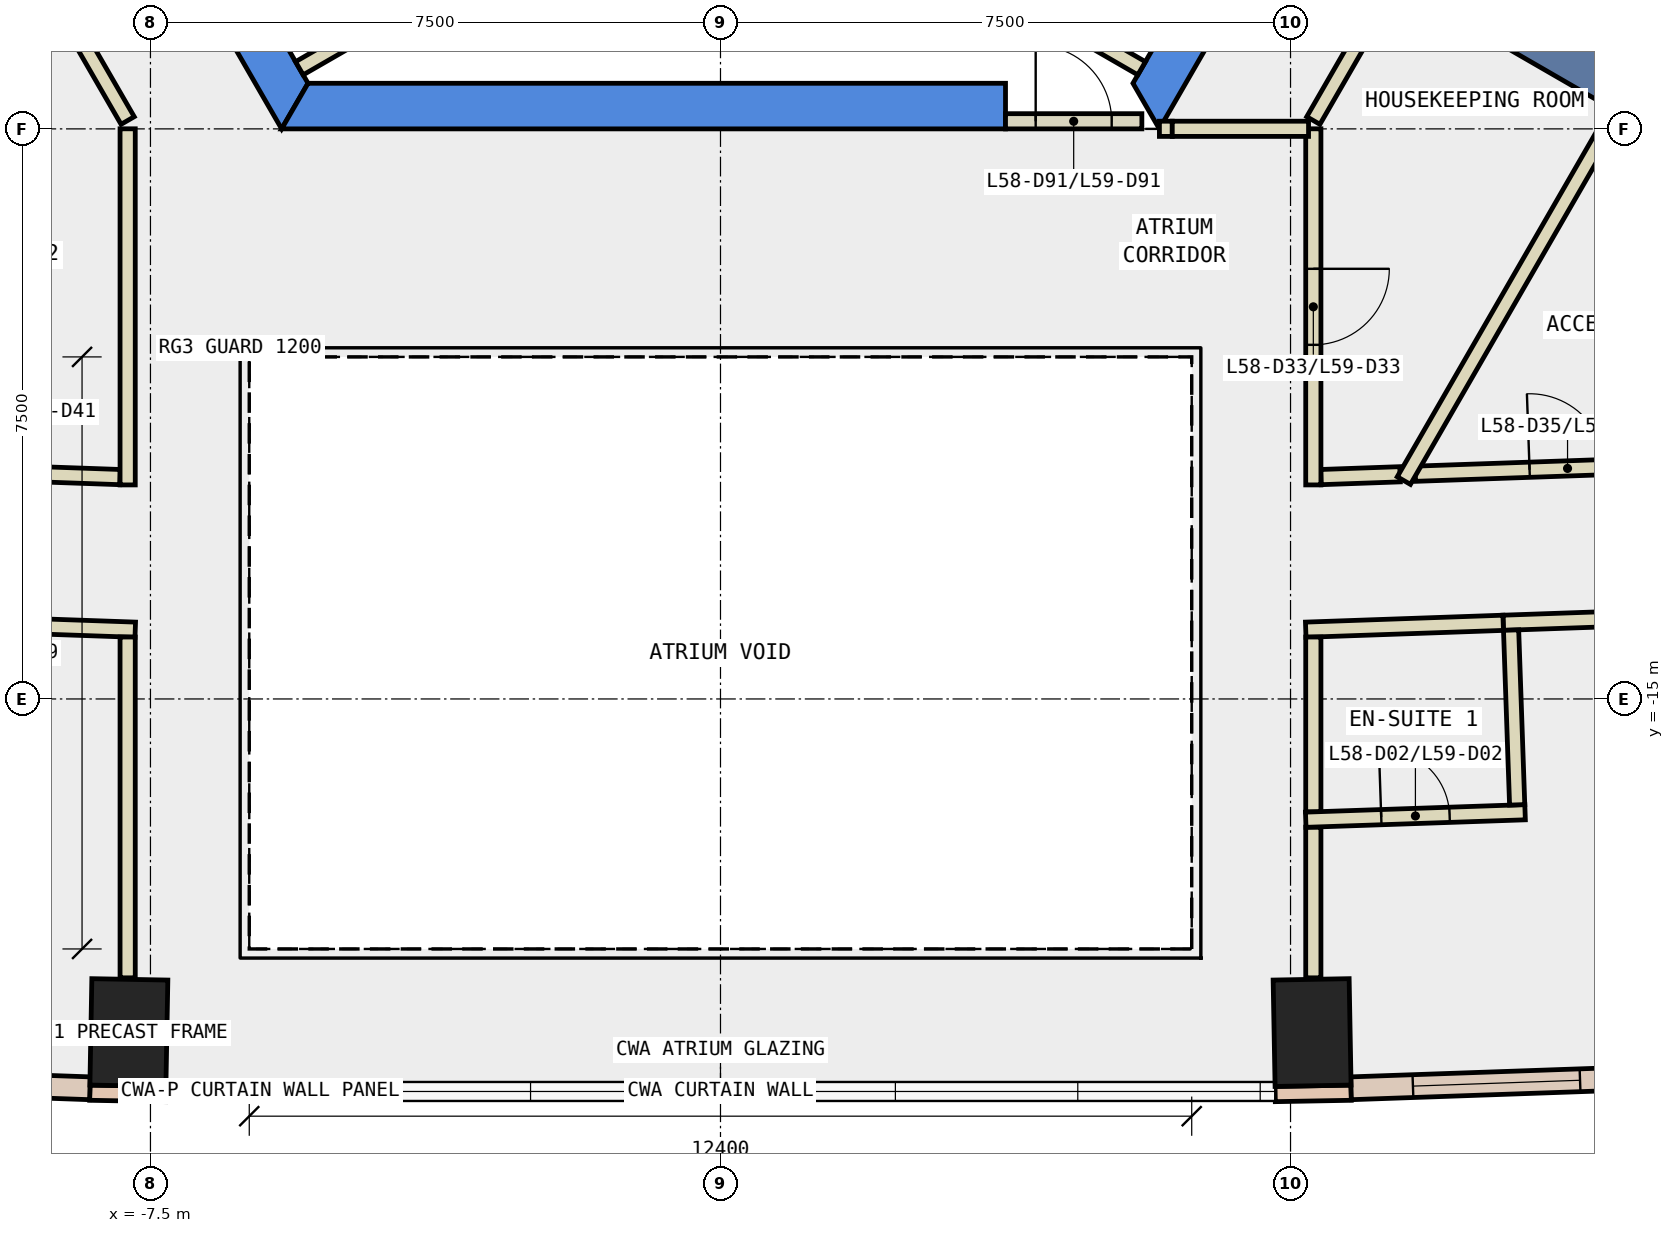
"""IFC4 building model, lengths in metres.
Left out: names, types, materials, properties, quantities, classifications, styles, units other than length and angle.
Written with IfcOpenShell. Run it as: python <this file> out.ifc"""

import sys

from ifc_helpers import new_model, si_unit, direction, frame, frame_2d, origin, origin_2d, place, context, subcontext, project, spatial, polyline, rectangle, outline, extrude, element, fill, save


model = new_model("IFC4")
c1 = context("Model", 3, precision=1e-05, world=origin(), true_north=direction((0.0, 1.0)))
c2 = subcontext(c1, "Body", "Model", "MODEL_VIEW")
j1 = project(units=[si_unit("LENGTHUNIT", "METRE"), si_unit("PLANEANGLEUNIT", "RADIAN")], contexts=[c1])
p1 = place(None, origin())
s1 = spatial("IfcSite", under=j1, at=p1, CompositionType="ELEMENT")
p2 = place(p1, origin())
s2 = spatial("IfcBuilding", under=s1, at=p2, CompositionType="ELEMENT")
p3 = place(p2, frame((0.0, 0.0, 255.8)))
s3 = spatial("IfcBuildingStorey", under=s2, at=p3, CompositionType="ELEMENT", Elevation=255.8)
for number, where, z_axis, x_axis in (
    (1, (-7.784, -19.389, -0.34), (0.0, 0.0, 1.0), (-1.0, 0.018, 0.0)),
    (2, (7.784, -19.389, -0.34), (0.0, 0.0, 1.0), (1.0, 0.018, 0.0)),
):
    element("IfcColumn", number, at=place(p3, frame(where, z_axis=z_axis, x_axis=x_axis)), inside=s3, PredefinedType="COLUMN", context=c2, shape_type="SweptSolid", body=[
        extrude(rectangle(XDim=1.0, YDim=1.4, at=origin_2d()), origin(), (0.0, 0.0, 1.0), 3.6),
    ])
p4 = place(p3, frame((0.0, 0.0, -0.34)))
e3 = element("IfcWall", 3, at=p4, inside=s3, PredefinedType="SHEAR", context=c2, shape_type="SweptSolid", body=[
    extrude(outline(polyline([(-11.547, 2.5), (-5.774, -7.5), (-5.427, -6.9), (-10.854, 2.5), (-11.547, 2.5)])), origin(), (0.0, 0.0, 1.0), 3.6),
])
p5 = place(p3, frame((0.0, 0.0, -0.34)))
e4 = element("IfcWall", 4, at=p5, inside=s3, PredefinedType="SHEAR", context=c2, shape_type="SweptSolid", body=[
    extrude(outline(polyline([(3.75, -7.5), (3.75, -6.9), (-5.427, -6.9), (-5.774, -7.5), (3.75, -7.5)])), origin(), (0.0, 0.0, 1.0), 3.6),
])
p6 = place(p3, frame((0.0, 0.0, -0.34)))
e5 = element("IfcWall", 5, at=p6, inside=s3, PredefinedType="SHEAR", context=c2, shape_type="SweptSolid", body=[
    extrude(outline(polyline([(5.774, -7.5), (11.547, 2.5), (10.854, 2.5), (5.427, -6.9), (5.774, -7.5)])), origin(), (0.0, 0.0, 1.0), 3.6),
])
for number, where, z_axis, x_axis in (
    (6, (7.578, -4.375, -0.34), (0.0, 0.0, 1.0), (0.866, -0.5, 0.0)),
    (7, (-7.578, -4.375, -0.34), (0.0, 0.0, 1.0), (-0.866, -0.5, 0.0)),
):
    element("IfcWall", number, at=place(p3, frame(where, z_axis=z_axis, x_axis=x_axis)), inside=s3, PredefinedType="SHEAR", context=c2, shape_type="SweptSolid", body=[
        extrude(rectangle(XDim=9.0, YDim=0.8, at=frame_2d((4.5, 0.0))), origin(), (0.0, 0.0, 1.0), 3.6),
    ])
for number, where, z_axis, x_axis in (
    (8, (-8.298, -20.18, 0.0), (0.0, 0.0, 1.0), (1.0, -0.018, 0.0)),
    (9, (7.298, -20.198, 0.0), (0.0, 0.0, 1.0), (1.0, 0.018, 0.0)),
):
    element("IfcWall", number, at=place(p3, frame(where, z_axis=z_axis, x_axis=x_axis)), inside=s3, PredefinedType="STANDARD", context=c2, shape_type="SweptSolid", body=[
        extrude(rectangle(XDim=1.0, YDim=0.2, at=frame_2d((0.5, 0.0))), origin(), (0.0, 0.0, 1.0), 3.26),
    ])
p7 = place(p3, frame((-15.952, -19.854, 0.0), z_axis=(0.0, 0.0, 1.0), x_axis=(0.999387577449, -0.034992428331, 0.0)))
e10 = element("IfcWall", 10, at=p7, inside=s3, PredefinedType="STANDARD", context=c2, shape_type="SweptSolid", body=[
    extrude(rectangle(XDim=7.661, YDim=0.3, at=frame_2d((3.83, 0.0))), origin(), (0.0, 0.0, 1.0), 3.26),
])
p8 = place(p7, frame((0.815, 0.0, 0.9)))
e11 = element("IfcOpeningElement", 11, at=p8, cuts=e10, PredefinedType="OPENING", context=c2, shape_type="SweptSolid", body=[
    extrude(rectangle(XDim=2.2, YDim=2.0, at=frame_2d((1.1, 1.0))), frame((0.0, 0.16, 0.0), z_axis=(0.0, -1.0, 0.0), x_axis=(1.0, 0.0, 0.0)), (0.0, 0.0, 1.0), 0.32),
])
p9 = place(p7, frame((4.646, 0.0, 0.9)))
e12 = element("IfcOpeningElement", 12, at=p9, cuts=e10, PredefinedType="OPENING", context=c2, shape_type="SweptSolid", body=[
    extrude(rectangle(XDim=2.2, YDim=2.0, at=frame_2d((1.1, 1.0))), frame((0.0, 0.16, 0.0), z_axis=(0.0, -1.0, 0.0), x_axis=(1.0, 0.0, 0.0)), (0.0, 0.0, 1.0), 0.32),
])
p10 = place(p3, frame((8.296, -20.122, 0.0), z_axis=(0.0, 0.0, 1.0), x_axis=(0.999387577449, 0.034992428331, 0.0)))
e13 = element("IfcWall", 13, at=p10, inside=s3, PredefinedType="STANDARD", context=c2, shape_type="SweptSolid", body=[
    extrude(rectangle(XDim=7.661, YDim=0.3, at=frame_2d((3.83, 0.0))), origin(), (0.0, 0.0, 1.0), 3.26),
])
p11 = place(p10, frame((0.815, 0.0, 0.9)))
e14 = element("IfcOpeningElement", 14, at=p11, cuts=e13, PredefinedType="OPENING", context=c2, shape_type="SweptSolid", body=[
    extrude(rectangle(XDim=2.2, YDim=2.0, at=frame_2d((1.1, 1.0))), frame((0.0, 0.16, 0.0), z_axis=(0.0, -1.0, 0.0), x_axis=(1.0, 0.0, 0.0)), (0.0, 0.0, 1.0), 0.32),
])
p12 = place(p10, frame((4.646, 0.0, 0.9)))
e15 = element("IfcOpeningElement", 15, at=p12, cuts=e13, PredefinedType="OPENING", context=c2, shape_type="SweptSolid", body=[
    extrude(rectangle(XDim=2.2, YDim=2.0, at=frame_2d((1.1, 1.0))), frame((0.0, 0.16, 0.0), z_axis=(0.0, -1.0, 0.0), x_axis=(1.0, 0.0, 0.0)), (0.0, 0.0, 1.0), 0.32),
])
p13 = place(p3, frame((7.9, -12.081, 0.0), z_axis=(0.0, 0.0, 1.0), x_axis=(0.999365240621, 0.035624652105, 0.0)))
e16 = element("IfcWall", 16, at=p13, inside=s3, PredefinedType="PARTITIONING", context=c2, shape_type="SweptSolid", body=[
    extrude(rectangle(XDim=1.042, YDim=0.2, at=frame_2d((0.521, 0.0))), origin(), (0.0, 0.0, 1.0), 3.26),
])
p14 = place(p3, frame((9.141, -12.037, 0.0), z_axis=(0.0, 0.0, 1.0), x_axis=(0.999388955878, 0.034953038062, 0.0)))
e17 = element("IfcWall", 17, at=p14, inside=s3, PredefinedType="PARTITIONING", context=c2, shape_type="SweptSolid", body=[
    extrude(rectangle(XDim=4.009, YDim=0.2, at=frame_2d((2.005, 0.0))), origin(), (0.0, 0.0, 1.0), 3.26),
])
p15 = place(p14, frame((1.505, 0.0, 0.0)))
e18 = element("IfcOpeningElement", 18, at=p15, cuts=e17, PredefinedType="OPENING", context=c2, shape_type="SweptSolid", body=[
    extrude(rectangle(XDim=1.0, YDim=2.1, at=frame_2d((0.5, 1.05))), frame((0.0, 0.11, 0.0), z_axis=(0.0, -1.0, 0.0), x_axis=(1.0, 0.0, 0.0)), (0.0, 0.0, 1.0), 0.22),
])
p16 = place(p3, frame((-7.8, -7.39, 0.0), z_axis=(0.0, 0.0, 1.0), x_axis=(-0.500266477503, 0.865871498253, 0.0)))
e19 = element("IfcWall", 19, at=p16, inside=s3, PredefinedType="PARTITIONING", context=c2, shape_type="SweptSolid", body=[
    extrude(rectangle(XDim=1.463, YDim=0.2, at=frame_2d((0.731, 0.0))), origin(), (0.0, 0.0, 1.0), 3.26),
])
p17 = place(p3, frame((-10.826, -11.978, 0.0), z_axis=(0.0, 0.0, 1.0), x_axis=(0.999380679818, -0.035188873332, 0.0)))
e20 = element("IfcWall", 20, at=p17, inside=s3, PredefinedType="PARTITIONING", context=c2, shape_type="SweptSolid", body=[
    extrude(rectangle(XDim=2.928, YDim=0.2, at=frame_2d((1.464, 0.0))), origin(), (0.0, 0.0, 1.0), 3.26),
])
p18 = place(p17, frame((0.964, 0.0, 0.0)))
e21 = element("IfcOpeningElement", 21, at=p18, cuts=e20, PredefinedType="OPENING", context=c2, shape_type="SweptSolid", body=[
    extrude(rectangle(XDim=1.0, YDim=2.1, at=frame_2d((0.5, 1.05))), frame((0.0, 0.11, 0.0), z_axis=(0.0, -1.0, 0.0), x_axis=(1.0, 0.0, 0.0)), (0.0, 0.0, 1.0), 0.22),
])
p19 = place(p3, frame((15.559, -13.814, 0.0), z_axis=(0.0, 0.0, 1.0), x_axis=(-0.999388410674, -0.034968623214, 0.0)))
e22 = element("IfcWall", 22, at=p19, inside=s3, PredefinedType="PARTITIONING", context=c2, shape_type="SweptSolid", body=[
    extrude(rectangle(XDim=5.264, YDim=0.2, at=frame_2d((2.632, 0.0))), origin(), (0.0, 0.0, 1.0), 3.26),
])
p20 = place(p19, frame((2.182, 0.0, 0.0)))
e23 = element("IfcOpeningElement", 23, at=p20, cuts=e22, PredefinedType="OPENING", context=c2, shape_type="SweptSolid", body=[
    extrude(rectangle(XDim=1.0, YDim=2.1, at=frame_2d((0.5, 1.05))), frame((0.0, 0.11, 0.0), z_axis=(0.0, -1.0, 0.0), x_axis=(1.0, 0.0, 0.0)), (0.0, 0.0, 1.0), 0.22),
])
p21 = place(p3, frame((10.298, -13.998, 0.0), z_axis=(0.0, 0.0, 1.0), x_axis=(-0.999386321032, -0.035028293342, 0.0)))
e24 = element("IfcWall", 24, at=p21, inside=s3, PredefinedType="PARTITIONING", context=c2, shape_type="SweptSolid", body=[
    extrude(rectangle(XDim=2.6, YDim=0.2, at=frame_2d((1.3, 0.0))), origin(), (0.0, 0.0, 1.0), 3.26),
])
p22 = place(p3, frame((-7.7, -14.089, 0.0), z_axis=(0.0, 0.0, 1.0), x_axis=(-0.999388410674, 0.034968623214, 0.0)))
e25 = element("IfcWall", 25, at=p22, inside=s3, PredefinedType="PARTITIONING", context=c2, shape_type="SweptSolid", body=[
    extrude(rectangle(XDim=5.264, YDim=0.2, at=frame_2d((2.632, 0.0))), origin(), (0.0, 0.0, 1.0), 3.26),
])
p23 = place(p22, frame((2.182, 0.0, 0.0)))
e26 = element("IfcOpeningElement", 26, at=p23, cuts=e25, PredefinedType="OPENING", context=c2, shape_type="SweptSolid", body=[
    extrude(rectangle(XDim=1.0, YDim=2.1, at=frame_2d((0.5, 1.05))), frame((0.0, 0.11, 0.0), z_axis=(0.0, -1.0, 0.0), x_axis=(1.0, 0.0, 0.0)), (0.0, 0.0, 1.0), 0.22),
])
for number, where, z_axis, x_axis in (
    (27, (5.541, -6.703, 0.0), (0.0, 0.0, 1.0), (-0.866, 0.5, 0.0)),
    (28, (-4.588, -6.153, 0.0), (0.0, 0.0, 1.0), (-0.866, -0.5, 0.0)),
):
    element("IfcWall", number, at=place(p3, frame(where, z_axis=z_axis, x_axis=x_axis)), inside=s3, PredefinedType="PARTITIONING", context=c2, shape_type="SweptSolid", body=[
        extrude(rectangle(XDim=1.1, YDim=0.2, at=frame_2d((0.55, 0.0))), origin(), (0.0, 0.0, 1.0), 3.26),
    ])
p24 = place(p3, frame((5.775, -7.499, 0.0), z_axis=(0.0, 0.0, 1.0), x_axis=(1.0, 0.0, 0.0)))
e29 = element("IfcWall", 29, at=p24, inside=s3, PredefinedType="PARTITIONING", context=c2, shape_type="SweptSolid", body=[
    extrude(rectangle(XDim=0.169, YDim=0.2, at=frame_2d((0.084, 0.0))), origin(), (0.0, 0.0, 1.0), 2.4),
])
p25 = place(p3, frame((7.8, -7.39, 0.0), z_axis=(0.0, 0.0, 1.0), x_axis=(0.499977374825, 0.866038466041, 0.0)))
e30 = element("IfcWall", 30, at=p25, inside=s3, PredefinedType="PARTITIONING", context=c2, shape_type="SweptSolid", body=[
    extrude(rectangle(XDim=2.1, YDim=0.2, at=frame_2d((1.05, 0.0))), origin(), (0.0, 0.0, 1.0), 3.26),
])
p26 = place(p3, frame((7.8, -7.499, 0.0), z_axis=(0.0, 0.0, 1.0), x_axis=(0.0, -1.0, 0.0)))
e31 = element("IfcWall", 31, at=p26, inside=s3, PredefinedType="PARTITIONING", context=c2, shape_type="SweptSolid", body=[
    extrude(rectangle(XDim=4.685, YDim=0.2, at=frame_2d((2.343, 0.0))), origin(), (0.0, 0.0, 1.0), 3.26),
])
p27 = place(p26, frame((1.842, 0.0, 0.0)))
e32 = element("IfcOpeningElement", 32, at=p27, cuts=e31, PredefinedType="OPENING", context=c2, shape_type="SweptSolid", body=[
    extrude(rectangle(XDim=1.0, YDim=2.1, at=frame_2d((0.5, 1.05))), frame((0.0, 0.11, 0.0), z_axis=(0.0, -1.0, 0.0), x_axis=(1.0, 0.0, 0.0)), (0.0, 0.0, 1.0), 0.22),
])
p28 = place(p3, frame((-7.8, -12.184, 0.0), z_axis=(0.0, 0.0, 1.0), x_axis=(0.0, 1.0, 0.0)))
e33 = element("IfcWall", 33, at=p28, inside=s3, PredefinedType="PARTITIONING", context=c2, shape_type="SweptSolid", body=[
    extrude(rectangle(XDim=4.685, YDim=0.2, at=frame_2d((2.343, 0.0))), origin(), (0.0, 0.0, 1.0), 3.26),
])
p29 = place(p3, frame((7.8, -16.686, 0.0), z_axis=(0.0, 0.0, 1.0), x_axis=(0.0, -1.0, 0.0)))
e34 = element("IfcWall", 34, at=p29, inside=s3, PredefinedType="PARTITIONING", context=c2, shape_type="SweptSolid", body=[
    extrude(rectangle(XDim=1.983, YDim=0.2, at=frame_2d((0.991, 0.0))), origin(), (0.0, 0.0, 1.0), 3.26),
])
p30 = place(p3, frame((7.8, -14.185, 0.0), z_axis=(0.0, 0.0, 1.0), x_axis=(0.0, -1.0, 0.0)))
e35 = element("IfcWall", 35, at=p30, inside=s3, PredefinedType="PARTITIONING", context=c2, shape_type="SweptSolid", body=[
    extrude(rectangle(XDim=2.301, YDim=0.2, at=frame_2d((1.15, 0.0))), origin(), (0.0, 0.0, 1.0), 3.26),
])
p31 = place(p3, frame((-7.8, -18.669, 0.0), z_axis=(0.0, 0.0, 1.0), x_axis=(0.0, 1.0, 0.0)))
e36 = element("IfcWall", 36, at=p31, inside=s3, PredefinedType="PARTITIONING", context=c2, shape_type="SweptSolid", body=[
    extrude(rectangle(XDim=4.484, YDim=0.2, at=frame_2d((2.242, 0.0))), origin(), (0.0, 0.0, 1.0), 3.26),
])
p32 = place(p3, frame((9.335, -4.732, 0.0), z_axis=(0.0, 0.0, 1.0), x_axis=(0.866002606077, -0.500039484709, 0.0)))
e37 = element("IfcWall", 37, at=p32, inside=s3, PredefinedType="PARTITIONING", context=c2, shape_type="SweptSolid", body=[
    extrude(rectangle(XDim=3.4, YDim=0.2, at=frame_2d((1.7, 0.0))), origin(), (0.0, 0.0, 1.0), 3.26),
])
p33 = place(p3, frame((11.794, -7.271, 0.0), z_axis=(0.0, 0.0, 1.0), x_axis=(-0.499918457185, -0.866072477433, 0.0)))
e38 = element("IfcWall", 38, at=p33, inside=s3, PredefinedType="PARTITIONING", context=c2, shape_type="SweptSolid", body=[
    extrude(rectangle(XDim=5.607, YDim=0.2, at=frame_2d((2.803, 0.0))), origin(), (0.0, 0.0, 1.0), 3.26),
])
p34 = place(p3, frame((-8.582, -6.036, 0.0), z_axis=(0.0, 0.0, 1.0), x_axis=(-0.897105141673, -0.441817116897, 0.0)))
e39 = element("IfcWall", 39, at=p34, inside=s3, PredefinedType="PARTITIONING", context=c2, shape_type="SweptSolid", body=[
    extrude(rectangle(XDim=5.111, YDim=0.2, at=frame_2d((2.555, 0.0))), origin(), (0.0, 0.0, 1.0), 3.26),
])
p35 = place(p3, frame((7.7, -16.589, 0.0), z_axis=(0.0, 0.0, 1.0), x_axis=(0.999410709261, 0.034325416459, 0.0)))
e40 = element("IfcWall", 40, at=p35, inside=s3, PredefinedType="PARTITIONING", context=c2, shape_type="SweptSolid", body=[
    extrude(rectangle(XDim=2.888, YDim=0.2, at=frame_2d((1.444, 0.0))), origin(), (0.0, 0.0, 1.0), 3.26),
])
p36 = place(p35, frame((0.994, 0.0, 0.0)))
e41 = element("IfcOpeningElement", 41, at=p36, cuts=e40, PredefinedType="OPENING", context=c2, shape_type="SweptSolid", body=[
    extrude(rectangle(XDim=0.9, YDim=2.1, at=frame_2d((0.45, 1.05))), frame((0.0, 0.11, 0.0), z_axis=(0.0, -1.0, 0.0), x_axis=(1.0, 0.0, 0.0)), (0.0, 0.0, 1.0), 0.22),
])
p37 = place(p3, frame((10.482, -16.393, 0.0), z_axis=(0.0, 0.0, 1.0), x_axis=(-0.034703518322, 0.999397651496, 0.0)))
e42 = element("IfcWall", 42, at=p37, inside=s3, PredefinedType="PARTITIONING", context=c2, shape_type="SweptSolid", body=[
    extrude(rectangle(XDim=2.301, YDim=0.2, at=frame_2d((1.15, 0.0))), origin(), (0.0, 0.0, 1.0), 3.26),
])
p38 = place(p3, frame((3.75, -7.4, 0.0), z_axis=(0.0, 0.0, 1.0), x_axis=(1.0, 0.0, 0.0)))
e43 = element("IfcWall", 43, at=p38, inside=s3, PredefinedType="PARTITIONING", context=c2, shape_type="SweptSolid", body=[
    extrude(rectangle(XDim=1.794, YDim=0.2, at=frame_2d((0.897, 0.0))), origin(), (0.0, 0.0, 1.0), 2.4),
])
p39 = place(p38, frame((0.397, 0.0, 0.0)))
e44 = element("IfcOpeningElement", 44, at=p39, cuts=e43, PredefinedType="OPENING", context=c2, shape_type="SweptSolid", body=[
    extrude(rectangle(XDim=1.0, YDim=2.1, at=frame_2d((0.5, 1.05))), frame((0.0, 0.11, 0.0), z_axis=(0.0, -1.0, 0.0), x_axis=(1.0, 0.0, 0.0)), (0.0, 0.0, 1.0), 0.22),
])
p40 = place(p3, frame((5.944, -7.499, 0.0), z_axis=(0.0, 0.0, 1.0), x_axis=(1.0, 0.0, 0.0)))
e45 = element("IfcWall", 45, at=p40, inside=s3, PredefinedType="PARTITIONING", context=c2, shape_type="SweptSolid", body=[
    extrude(rectangle(XDim=1.793, YDim=0.2, at=frame_2d((0.896, 0.0))), origin(), (0.0, 0.0, 1.0), 3.26),
])
p41 = place(p11, origin())
e46 = element("IfcWindow", 46, at=p41, inside=s3, PartitioningType="SINGLE_PANEL", PredefinedType="WINDOW", context=c2, shape_type="SweptSolid", body=[
    extrude(rectangle(XDim=2.2, YDim=2.0, at=frame_2d((1.1, 1.0))), frame((0.0, 0.03, 0.0), z_axis=(0.0, -1.0, 0.0), x_axis=(1.0, 0.0, 0.0)), (0.0, 0.0, 1.0), 0.06),
])
fill(e14, e46)
p42 = place(p36, origin())
e47 = element("IfcDoor", 47, at=p42, inside=s3, OperationType="SINGLE_SWING_LEFT", PredefinedType="DOOR", context=c2, shape_type="SweptSolid", body=[
    extrude(rectangle(XDim=0.9, YDim=2.1, at=frame_2d((0.45, 1.05))), frame((0.0, 0.025, 0.0), z_axis=(0.0, -1.0, 0.0), x_axis=(1.0, 0.0, 0.0)), (0.0, 0.0, 1.0), 0.05),
])
fill(e41, e47)
p43 = place(p27, origin())
e48 = element("IfcDoor", 48, at=p43, inside=s3, OperationType="SINGLE_SWING_LEFT", PredefinedType="DOOR", context=c2, shape_type="SweptSolid", body=[
    extrude(rectangle(XDim=1.0, YDim=2.1, at=frame_2d((0.5, 1.05))), frame((0.0, 0.025, 0.0), z_axis=(0.0, -1.0, 0.0), x_axis=(1.0, 0.0, 0.0)), (0.0, 0.0, 1.0), 0.05),
])
fill(e32, e48)
p44 = place(p15, origin())
e49 = element("IfcDoor", 49, at=p44, inside=s3, OperationType="SINGLE_SWING_LEFT", PredefinedType="DOOR", context=c2, shape_type="SweptSolid", body=[
    extrude(rectangle(XDim=1.0, YDim=2.1, at=frame_2d((0.5, 1.05))), frame((0.0, 0.025, 0.0), z_axis=(0.0, -1.0, 0.0), x_axis=(1.0, 0.0, 0.0)), (0.0, 0.0, 1.0), 0.05),
])
fill(e18, e49)
p45 = place(p39, origin())
e50 = element("IfcDoor", 50, at=p45, inside=s3, OperationType="SINGLE_SWING_LEFT", PredefinedType="DOOR", context=c2, shape_type="SweptSolid", body=[
    extrude(rectangle(XDim=1.0, YDim=2.1, at=frame_2d((0.5, 1.05))), frame((0.0, 0.025, 0.0), z_axis=(0.0, -1.0, 0.0), x_axis=(1.0, 0.0, 0.0)), (0.0, 0.0, 1.0), 0.05),
])
fill(e44, e50)
save(model, sys.argv[1])
